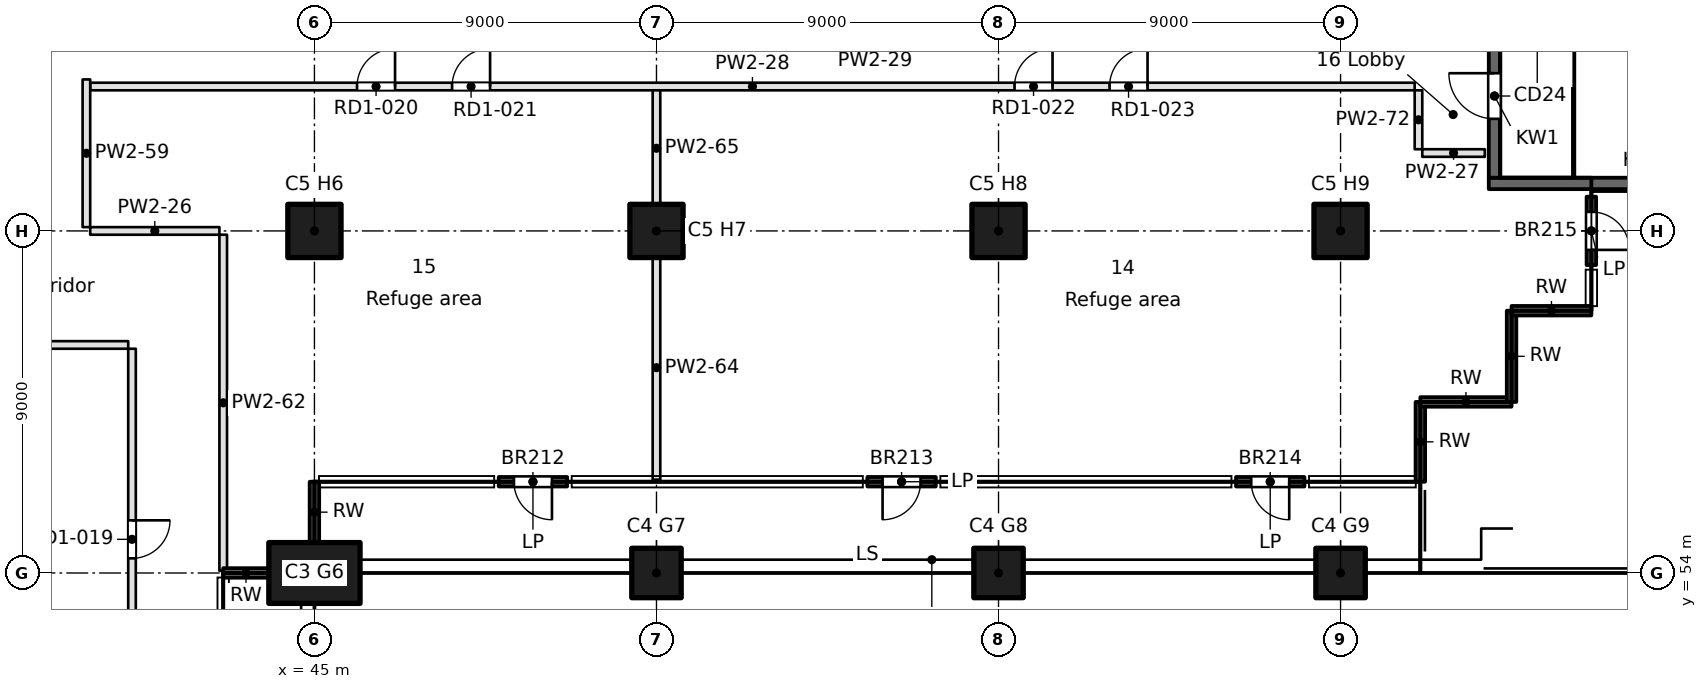
"""IFC4 building model, lengths in metres.
Left out: names, types, materials, properties, quantities, classifications, styles, units other than length and angle.
Written with IfcOpenShell. Run it as: python <this file> out.ifc"""

import sys

from ifc_helpers import new_model, si_unit, direction, frame, frame_2d, origin, origin_2d, place, context, subcontext, project, spatial, rectangle, extrude, element, fill, save


model = new_model("IFC4")
c1 = context("Model", 3, precision=1e-05, world=origin(), true_north=direction((0.0, 1.0)))
c2 = subcontext(c1, "Body", "Model", "MODEL_VIEW")
j1 = project(units=[si_unit("LENGTHUNIT", "METRE"), si_unit("PLANEANGLEUNIT", "RADIAN")], contexts=[c1])
p1 = place(None, origin())
s1 = spatial("IfcSite", under=j1, at=p1, CompositionType="ELEMENT")
p2 = place(p1, origin())
s2 = spatial("IfcBuilding", under=s1, at=p2, CompositionType="ELEMENT")
p3 = place(p2, frame((0.0, 0.0, 80.2)))
s3 = spatial("IfcBuildingStorey", under=s2, at=p3, CompositionType="ELEMENT", Elevation=80.2)
p4 = place(p3, frame((45.0, 54.0, 0.0), z_axis=(0.0, 0.0, 1.0), x_axis=(1.0, 0.0, 0.0)))
e1 = element("IfcColumn", 1, at=p4, inside=s3, PredefinedType="COLUMN", context=c2, shape_type="SweptSolid", body=[
    extrude(rectangle(XDim=2.4, YDim=1.6, at=origin_2d()), origin(), (0.0, 0.0, 1.0), 4.6),
])
for number, where, z_axis, x_axis in (
    (2, (54.0, 54.0, 0.0), (0.0, 0.0, 1.0), (1.0, 0.0, 0.0)),
    (3, (63.0, 54.0, 0.0), (0.0, 0.0, 1.0), (1.0, 0.0, 0.0)),
    (4, (72.0, 54.0, 0.0), (0.0, 0.0, 1.0), (1.0, 0.0, 0.0)),
):
    element("IfcColumn", number, at=place(p3, frame(where, z_axis=z_axis, x_axis=x_axis)), inside=s3, PredefinedType="COLUMN", context=c2, shape_type="SweptSolid", body=[
        extrude(rectangle(XDim=1.3, YDim=1.3, at=origin_2d()), origin(), (0.0, 0.0, 1.0), 4.6),
    ])
for number, where, z_axis, x_axis in (
    (5, (45.0, 63.0, 0.0), (0.0, 0.0, 1.0), (1.0, 0.0, 0.0)),
    (6, (54.0, 63.0, 0.0), (0.0, 0.0, 1.0), (1.0, 0.0, 0.0)),
    (7, (63.0, 63.0, 0.0), (0.0, 0.0, 1.0), (1.0, 0.0, 0.0)),
    (8, (72.0, 63.0, 0.0), (0.0, 0.0, 1.0), (1.0, 0.0, 0.0)),
):
    element("IfcColumn", number, at=place(p3, frame(where, z_axis=z_axis, x_axis=x_axis)), inside=s3, PredefinedType="COLUMN", context=c2, shape_type="SweptSolid", body=[
        extrude(rectangle(XDim=1.4, YDim=1.4, at=origin_2d()), origin(), (0.0, 0.0, 1.0), 4.6),
    ])
p5 = place(p3, frame((42.599, 54.001, 0.0), z_axis=(0.0, 0.0, 1.0), x_axis=(1.0, 0.0, 0.0)))
e9 = element("IfcWall", 9, at=p5, inside=s3, PredefinedType="SOLIDWALL", context=c2, shape_type="SweptSolid", body=[
    extrude(rectangle(XDim=1.201, YDim=0.25, at=frame_2d((0.6, 0.0))), origin(), (0.0, 0.0, 1.0), 4.2),
])
p6 = place(p3, frame((44.999, 54.8, 0.0), z_axis=(0.0, 0.0, 1.0), x_axis=(0.00045752626, 0.999999895335, 0.0)))
e10 = element("IfcWall", 10, at=p6, inside=s3, PredefinedType="SOLIDWALL", context=c2, shape_type="SweptSolid", body=[
    extrude(rectangle(XDim=1.601, YDim=0.25, at=frame_2d((0.8, 0.0))), origin(), (0.0, 0.0, 1.0), 4.2),
])
p7 = place(p3, frame((49.85, 56.401, 0.0), z_axis=(0.0, 0.0, 1.0), x_axis=(1.0, 0.0, 0.0)))
e11 = element("IfcWall", 11, at=p7, inside=s3, PredefinedType="SOLIDWALL", context=c2, shape_type="SweptSolid", body=[
    extrude(rectangle(XDim=1.8, YDim=0.25, at=frame_2d((0.9, 0.0))), origin(), (0.0, 0.0, 1.0), 4.2),
])
p8 = place(p7, frame((0.4, 0.0, 0.0)))
e12 = element("IfcOpeningElement", 12, at=p8, cuts=e11, PredefinedType="OPENING", context=c2, shape_type="SweptSolid", body=[
    extrude(rectangle(XDim=1.0, YDim=2.1, at=frame_2d((0.5, 1.05))), frame((0.0, 0.125, 0.0), z_axis=(0.0, -1.0, 0.0), x_axis=(1.0, 0.0, 0.0)), (0.0, 0.0, 1.0), 0.25),
])
p9 = place(p3, frame((59.55, 56.401, 0.0), z_axis=(0.0, 0.0, 1.0), x_axis=(1.0, 0.0, 0.0)))
e13 = element("IfcWall", 13, at=p9, inside=s3, PredefinedType="SOLIDWALL", context=c2, shape_type="SweptSolid", body=[
    extrude(rectangle(XDim=1.8, YDim=0.25, at=frame_2d((0.9, 0.0))), origin(), (0.0, 0.0, 1.0), 4.2),
])
p10 = place(p9, frame((0.4, 0.0, 0.0)))
e14 = element("IfcOpeningElement", 14, at=p10, cuts=e13, PredefinedType="OPENING", context=c2, shape_type="SweptSolid", body=[
    extrude(rectangle(XDim=1.0, YDim=2.1, at=frame_2d((0.5, 1.05))), frame((0.0, 0.125, 0.0), z_axis=(0.0, -1.0, 0.0), x_axis=(1.0, 0.0, 0.0)), (0.0, 0.0, 1.0), 0.25),
])
p11 = place(p3, frame((69.249, 56.401, 0.0), z_axis=(0.0, 0.0, 1.0), x_axis=(1.0, 0.0, 0.0)))
e15 = element("IfcWall", 15, at=p11, inside=s3, PredefinedType="SOLIDWALL", context=c2, shape_type="SweptSolid", body=[
    extrude(rectangle(XDim=1.8, YDim=0.25, at=frame_2d((0.9, 0.0))), origin(), (0.0, 0.0, 1.0), 4.2),
])
p12 = place(p11, frame((0.4, 0.0, 0.0)))
e16 = element("IfcOpeningElement", 16, at=p12, cuts=e15, PredefinedType="OPENING", context=c2, shape_type="SweptSolid", body=[
    extrude(rectangle(XDim=1.0, YDim=2.1, at=frame_2d((0.5, 1.05))), frame((0.0, 0.125, 0.0), z_axis=(0.0, -1.0, 0.0), x_axis=(1.0, 0.0, 0.0)), (0.0, 0.0, 1.0), 0.25),
])
p13 = place(p3, frame((74.099, 56.401, 0.0), z_axis=(0.0, 0.0, 1.0), x_axis=(0.00011626555, 0.999999993241, 0.0)))
e17 = element("IfcWall", 17, at=p13, inside=s3, PredefinedType="SOLIDWALL", context=c2, shape_type="SweptSolid", body=[
    extrude(rectangle(XDim=2.1, YDim=0.25, at=frame_2d((1.05, 0.0))), origin(), (0.0, 0.0, 1.0), 4.2),
])
for number, where, z_axis, x_axis in (
    (18, (74.099, 58.501, 0.0), (0.0, 0.0, 1.0), (1.0, 0.0, 0.0)),
    (19, (76.499, 58.501, 0.0), (0.0, 0.0, 1.0), (0.0, 1.0, 0.0)),
):
    element("IfcWall", number, at=place(p3, frame(where, z_axis=z_axis, x_axis=x_axis)), inside=s3, PredefinedType="SOLIDWALL", context=c2, shape_type="SweptSolid", body=[
        extrude(rectangle(XDim=2.4, YDim=0.25, at=frame_2d((1.2, 0.0))), origin(), (0.0, 0.0, 1.0), 4.2),
    ])
p14 = place(p3, frame((76.499, 60.901, 0.0), z_axis=(0.0, 0.0, 1.0), x_axis=(0.999999993241, 0.00011626555, 0.0)))
e20 = element("IfcWall", 20, at=p14, inside=s3, PredefinedType="SOLIDWALL", context=c2, shape_type="SweptSolid", body=[
    extrude(rectangle(XDim=2.1, YDim=0.25, at=frame_2d((1.05, 0.0))), origin(), (0.0, 0.0, 1.0), 4.2),
])
p15 = place(p3, frame((78.599, 62.101, 0.0), z_axis=(0.0, 0.0, 1.0), x_axis=(0.0, 1.0, 0.0)))
e21 = element("IfcWall", 21, at=p15, inside=s3, PredefinedType="SOLIDWALL", context=c2, shape_type="SweptSolid", body=[
    extrude(rectangle(XDim=1.8, YDim=0.25, at=frame_2d((0.9, 0.0))), origin(), (0.0, 0.0, 1.0), 4.2),
])
p16 = place(p15, frame((0.4, 0.0, 0.0)))
e22 = element("IfcOpeningElement", 22, at=p16, cuts=e21, PredefinedType="OPENING", context=c2, shape_type="SweptSolid", body=[
    extrude(rectangle(XDim=1.0, YDim=2.1, at=frame_2d((0.5, 1.05))), frame((0.0, 0.125, 0.0), z_axis=(0.0, -1.0, 0.0), x_axis=(1.0, 0.0, 0.0)), (0.0, 0.0, 1.0), 0.25),
])
p17 = place(p3, frame((75.9, 64.25, -0.45), z_axis=(0.0, 0.0, 1.0), x_axis=(1.0, 0.0, 0.0)))
e23 = element("IfcWall", 23, at=p17, inside=s3, PredefinedType="SOLIDWALL", context=c2, shape_type="SweptSolid", body=[
    extrude(rectangle(XDim=8.2, YDim=0.3, at=frame_2d((4.1, 0.0))), origin(), (0.0, 0.0, 1.0), 4.65),
])
p18 = place(p3, frame((76.05, 64.4, -0.45), z_axis=(0.0, 0.0, 1.0), x_axis=(0.0, 1.0, 0.0)))
e24 = element("IfcWall", 24, at=p18, inside=s3, PredefinedType="SOLIDWALL", context=c2, shape_type="SweptSolid", body=[
    extrude(rectangle(XDim=4.3, YDim=0.3, at=frame_2d((2.15, 0.0))), origin(), (0.0, 0.0, 1.0), 4.65),
])
p19 = place(p18, frame((1.55, 0.0, 0.45)))
e25 = element("IfcOpeningElement", 25, at=p19, cuts=e24, PredefinedType="OPENING", context=c2, shape_type="SweptSolid", body=[
    extrude(rectangle(XDim=1.2, YDim=2.1, at=frame_2d((0.6, 1.05))), frame((0.0, 0.15, 0.0), z_axis=(0.0, -1.0, 0.0), x_axis=(1.0, 0.0, 0.0)), (0.0, 0.0, 1.0), 0.3),
])
p20 = place(p3, frame((40.1, 60.0, 0.0), z_axis=(0.0, 0.0, 1.0), x_axis=(-1.0, 0.0, 0.0)))
e26 = element("IfcWall", 26, at=p20, inside=s3, PredefinedType="PARTITIONING", context=c2, shape_type="SweptSolid", body=[
    extrude(rectangle(XDim=13.853, YDim=0.2, at=frame_2d((6.926, 0.0))), origin(), (0.0, 0.0, 1.0), 4.2),
])
p21 = place(p3, frame((39.1, 63.0, 0.0), z_axis=(0.0, 0.0, 1.0), x_axis=(1.0, 0.0, 0.0)))
e27 = element("IfcWall", 27, at=p21, inside=s3, PredefinedType="PARTITIONING", context=c2, shape_type="SweptSolid", body=[
    extrude(rectangle(XDim=3.4, YDim=0.2, at=frame_2d((1.7, 0.0))), origin(), (0.0, 0.0, 1.0), 4.2),
])
p22 = place(p3, frame((75.796, 65.05, 0.0), z_axis=(0.0, 0.0, 1.0), x_axis=(-1.0, 0.0, 0.0)))
e28 = element("IfcWall", 28, at=p22, inside=s3, PredefinedType="PARTITIONING", context=c2, shape_type="SweptSolid", body=[
    extrude(rectangle(XDim=1.646, YDim=0.2, at=frame_2d((0.823, 0.0))), origin(), (0.0, 0.0, 1.0), 4.2),
])
p23 = place(p3, frame((73.95, 66.8, 0.0), z_axis=(0.0, 0.0, 1.0), x_axis=(-1.0, 0.0, 0.0)))
e29 = element("IfcWall", 29, at=p23, inside=s3, PredefinedType="PARTITIONING", context=c2, shape_type="SweptSolid", body=[
    extrude(rectangle(XDim=34.85, YDim=0.2, at=frame_2d((17.425, 0.0))), origin(), (0.0, 0.0, 1.0), 4.2),
])
p24 = place(p23, frame((26.828, 0.0, 0.0)))
e30 = element("IfcOpeningElement", 30, at=p24, cuts=e29, PredefinedType="OPENING", context=c2, shape_type="SweptSolid", body=[
    extrude(rectangle(XDim=1.0, YDim=2.1, at=frame_2d((0.5, 1.05))), frame((0.0, 0.1, 0.0), z_axis=(0.0, -1.0, 0.0), x_axis=(1.0, 0.0, 0.0)), (0.0, 0.0, 1.0), 0.2),
])
p25 = place(p23, frame((24.328, 0.0, 0.0)))
e31 = element("IfcOpeningElement", 31, at=p25, cuts=e29, PredefinedType="OPENING", context=c2, shape_type="SweptSolid", body=[
    extrude(rectangle(XDim=1.0, YDim=2.1, at=frame_2d((0.5, 1.05))), frame((0.0, 0.1, 0.0), z_axis=(0.0, -1.0, 0.0), x_axis=(1.0, 0.0, 0.0)), (0.0, 0.0, 1.0), 0.2),
])
p26 = place(p23, frame((9.529, 0.0, 0.0)))
e32 = element("IfcOpeningElement", 32, at=p26, cuts=e29, PredefinedType="OPENING", context=c2, shape_type="SweptSolid", body=[
    extrude(rectangle(XDim=1.0, YDim=2.1, at=frame_2d((0.5, 1.05))), frame((0.0, 0.1, 0.0), z_axis=(0.0, -1.0, 0.0), x_axis=(1.0, 0.0, 0.0)), (0.0, 0.0, 1.0), 0.2),
])
p27 = place(p23, frame((7.029, 0.0, 0.0)))
e33 = element("IfcOpeningElement", 33, at=p27, cuts=e29, PredefinedType="OPENING", context=c2, shape_type="SweptSolid", body=[
    extrude(rectangle(XDim=1.0, YDim=2.1, at=frame_2d((0.5, 1.05))), frame((0.0, 0.1, 0.0), z_axis=(0.0, -1.0, 0.0), x_axis=(1.0, 0.0, 0.0)), (0.0, 0.0, 1.0), 0.2),
])
p28 = place(p3, frame((39.0, 66.986, 0.0), z_axis=(0.0, 0.0, 1.0), x_axis=(0.0, -1.0, 0.0)))
e34 = element("IfcWall", 34, at=p28, inside=s3, PredefinedType="PARTITIONING", context=c2, shape_type="SweptSolid", body=[
    extrude(rectangle(XDim=3.886, YDim=0.2, at=frame_2d((1.943, 0.0))), origin(), (0.0, 0.0, 1.0), 4.2),
])
p29 = place(p3, frame((40.2, 19.322, 0.0), z_axis=(0.0, 0.0, 1.0), x_axis=(0.0, 1.0, 0.0)))
e35 = element("IfcWall", 35, at=p29, inside=s3, PredefinedType="PARTITIONING", context=c2, shape_type="SweptSolid", body=[
    extrude(rectangle(XDim=40.578, YDim=0.2, at=frame_2d((20.289, 0.0))), origin(), (0.0, 0.0, 1.0), 4.2),
])
p30 = place(p29, frame((3.383, 0.0, 0.0)))
e36 = element("IfcOpeningElement", 36, at=p30, cuts=e35, PredefinedType="OPENING", context=c2, shape_type="SweptSolid", body=[
    extrude(rectangle(XDim=1.0, YDim=2.1, at=frame_2d((0.5, 1.05))), frame((0.0, 0.1, 0.0), z_axis=(0.0, -1.0, 0.0), x_axis=(1.0, 0.0, 0.0)), (0.0, 0.0, 1.0), 0.2),
])
p31 = place(p29, frame((5.883, 0.0, 0.0)))
e37 = element("IfcOpeningElement", 37, at=p31, cuts=e35, PredefinedType="OPENING", context=c2, shape_type="SweptSolid", body=[
    extrude(rectangle(XDim=1.0, YDim=2.1, at=frame_2d((0.5, 1.05))), frame((0.0, 0.1, 0.0), z_axis=(0.0, -1.0, 0.0), x_axis=(1.0, 0.0, 0.0)), (0.0, 0.0, 1.0), 0.2),
])
p32 = place(p29, frame((11.774, 0.0, 0.0)))
e38 = element("IfcOpeningElement", 38, at=p32, cuts=e35, PredefinedType="OPENING", context=c2, shape_type="SweptSolid", body=[
    extrude(rectangle(XDim=1.0, YDim=2.1, at=frame_2d((0.5, 1.05))), frame((0.0, 0.1, 0.0), z_axis=(0.0, -1.0, 0.0), x_axis=(1.0, 0.0, 0.0)), (0.0, 0.0, 1.0), 0.2),
])
p33 = place(p29, frame((14.274, 0.0, 0.0)))
e39 = element("IfcOpeningElement", 39, at=p33, cuts=e35, PredefinedType="OPENING", context=c2, shape_type="SweptSolid", body=[
    extrude(rectangle(XDim=1.0, YDim=2.1, at=frame_2d((0.5, 1.05))), frame((0.0, 0.1, 0.0), z_axis=(0.0, -1.0, 0.0), x_axis=(1.0, 0.0, 0.0)), (0.0, 0.0, 1.0), 0.2),
])
p34 = place(p29, frame((20.791, 0.0, 0.0)))
e40 = element("IfcOpeningElement", 40, at=p34, cuts=e35, PredefinedType="OPENING", context=c2, shape_type="SweptSolid", body=[
    extrude(rectangle(XDim=1.0, YDim=2.1, at=frame_2d((0.5, 1.05))), frame((0.0, 0.1, 0.0), z_axis=(0.0, -1.0, 0.0), x_axis=(1.0, 0.0, 0.0)), (0.0, 0.0, 1.0), 0.2),
])
p35 = place(p29, frame((23.291, 0.0, 0.0)))
e41 = element("IfcOpeningElement", 41, at=p35, cuts=e35, PredefinedType="OPENING", context=c2, shape_type="SweptSolid", body=[
    extrude(rectangle(XDim=1.0, YDim=2.1, at=frame_2d((0.5, 1.05))), frame((0.0, 0.1, 0.0), z_axis=(0.0, -1.0, 0.0), x_axis=(1.0, 0.0, 0.0)), (0.0, 0.0, 1.0), 0.2),
])
p36 = place(p29, frame((32.564, 0.0, 0.0)))
e42 = element("IfcOpeningElement", 42, at=p36, cuts=e35, PredefinedType="OPENING", context=c2, shape_type="SweptSolid", body=[
    extrude(rectangle(XDim=1.0, YDim=2.1, at=frame_2d((0.5, 1.05))), frame((0.0, 0.1, 0.0), z_axis=(0.0, -1.0, 0.0), x_axis=(1.0, 0.0, 0.0)), (0.0, 0.0, 1.0), 0.2),
])
p37 = place(p29, frame((35.064, 0.0, 0.0)))
e43 = element("IfcOpeningElement", 43, at=p37, cuts=e35, PredefinedType="OPENING", context=c2, shape_type="SweptSolid", body=[
    extrude(rectangle(XDim=1.0, YDim=2.1, at=frame_2d((0.5, 1.05))), frame((0.0, 0.1, 0.0), z_axis=(0.0, -1.0, 0.0), x_axis=(1.0, 0.0, 0.0)), (0.0, 0.0, 1.0), 0.2),
])
p38 = place(p3, frame((42.6, 62.9, 0.0), z_axis=(0.0, 0.0, 1.0), x_axis=(0.0, -1.0, 0.0)))
e44 = element("IfcWall", 44, at=p38, inside=s3, PredefinedType="PARTITIONING", context=c2, shape_type="SweptSolid", body=[
    extrude(rectangle(XDim=8.845, YDim=0.2, at=frame_2d((4.423, 0.0))), origin(), (0.0, 0.0, 1.0), 4.2),
])
p39 = place(p3, frame((54.0, 62.35, 0.0), z_axis=(0.0, 0.0, 1.0), x_axis=(0.0, -1.0, 0.0)))
e45 = element("IfcWall", 45, at=p39, inside=s3, PredefinedType="PARTITIONING", context=c2, shape_type="SweptSolid", body=[
    extrude(rectangle(XDim=5.895, YDim=0.2, at=frame_2d((2.948, 0.0))), origin(), (0.0, 0.0, 1.0), 4.2),
])
p40 = place(p3, frame((54.0, 66.7, 0.0), z_axis=(0.0, 0.0, 1.0), x_axis=(0.0, -1.0, 0.0)))
e46 = element("IfcWall", 46, at=p40, inside=s3, PredefinedType="PARTITIONING", context=c2, shape_type="SweptSolid", body=[
    extrude(rectangle(XDim=3.05, YDim=0.2, at=frame_2d((1.525, 0.0))), origin(), (0.0, 0.0, 1.0), 4.2),
])
p41 = place(p3, frame((74.05, 65.15, 0.0), z_axis=(0.0, 0.0, 1.0), x_axis=(0.0, 1.0, 0.0)))
e47 = element("IfcWall", 47, at=p41, inside=s3, PredefinedType="PARTITIONING", context=c2, shape_type="SweptSolid", body=[
    extrude(rectangle(XDim=1.55, YDim=0.2, at=frame_2d((0.775, 0.0))), origin(), (0.0, 0.0, 1.0), 4.2),
])
p42 = place(p8, frame((1.0, 0.0, 0.0), z_axis=(0.0, 0.0, 1.0), x_axis=(-1.0, 0.0, 0.0)))
e48 = element("IfcDoor", 48, at=p42, inside=s3, OperationType="SINGLE_SWING_LEFT", PredefinedType="DOOR", context=c2, shape_type="SweptSolid", body=[
    extrude(rectangle(XDim=1.0, YDim=2.1, at=frame_2d((0.5, 1.05))), frame((0.0, 0.025, 0.0), z_axis=(0.0, -1.0, 0.0), x_axis=(1.0, 0.0, 0.0)), (0.0, 0.0, 1.0), 0.05),
])
fill(e12, e48)
p43 = place(p10, frame((1.0, 0.0, 0.0), z_axis=(0.0, 0.0, 1.0), x_axis=(-1.0, 0.0, 0.0)))
e49 = element("IfcDoor", 49, at=p43, inside=s3, OperationType="SINGLE_SWING_RIGHT", PredefinedType="DOOR", context=c2, shape_type="SweptSolid", body=[
    extrude(rectangle(XDim=1.0, YDim=2.1, at=frame_2d((0.5, 1.05))), frame((0.0, 0.025, 0.0), z_axis=(0.0, -1.0, 0.0), x_axis=(1.0, 0.0, 0.0)), (0.0, 0.0, 1.0), 0.05),
])
fill(e14, e49)
p44 = place(p12, frame((1.0, 0.0, 0.0), z_axis=(0.0, 0.0, 1.0), x_axis=(-1.0, 0.0, 0.0)))
e50 = element("IfcDoor", 50, at=p44, inside=s3, OperationType="SINGLE_SWING_LEFT", PredefinedType="DOOR", context=c2, shape_type="SweptSolid", body=[
    extrude(rectangle(XDim=1.0, YDim=2.1, at=frame_2d((0.5, 1.05))), frame((0.0, 0.025, 0.0), z_axis=(0.0, -1.0, 0.0), x_axis=(1.0, 0.0, 0.0)), (0.0, 0.0, 1.0), 0.05),
])
fill(e16, e50)
p45 = place(p16, frame((1.0, 0.0, 0.0), z_axis=(0.0, 0.0, 1.0), x_axis=(-1.0, 0.0, 0.0)))
e51 = element("IfcDoor", 51, at=p45, inside=s3, OperationType="SINGLE_SWING_RIGHT", PredefinedType="DOOR", context=c2, shape_type="SweptSolid", body=[
    extrude(rectangle(XDim=1.0, YDim=2.1, at=frame_2d((0.5, 1.05))), frame((0.0, 0.025, 0.0), z_axis=(0.0, -1.0, 0.0), x_axis=(1.0, 0.0, 0.0)), (0.0, 0.0, 1.0), 0.05),
])
fill(e22, e51)
p46 = place(p19, origin())
e52 = element("IfcDoor", 52, at=p46, inside=s3, OperationType="SINGLE_SWING_RIGHT", PredefinedType="DOOR", context=c2, shape_type="SweptSolid", body=[
    extrude(rectangle(XDim=1.2, YDim=2.1, at=frame_2d((0.6, 1.05))), frame((0.0, 0.025, 0.0), z_axis=(0.0, -1.0, 0.0), x_axis=(1.0, 0.0, 0.0)), (0.0, 0.0, 1.0), 0.05),
])
fill(e25, e52)
p47 = place(p37, frame((1.0, 0.0, 0.0), z_axis=(0.0, 0.0, 1.0), x_axis=(-1.0, 0.0, 0.0)))
e53 = element("IfcDoor", 53, at=p47, inside=s3, OperationType="SINGLE_SWING_LEFT", PredefinedType="DOOR", context=c2, shape_type="SweptSolid", body=[
    extrude(rectangle(XDim=1.0, YDim=2.1, at=frame_2d((0.5, 1.05))), frame((0.0, 0.025, 0.0), z_axis=(0.0, -1.0, 0.0), x_axis=(1.0, 0.0, 0.0)), (0.0, 0.0, 1.0), 0.05),
])
fill(e43, e53)
p48 = place(p24, frame((1.0, 0.0, 0.0), z_axis=(0.0, 0.0, 1.0), x_axis=(-1.0, 0.0, 0.0)))
e54 = element("IfcDoor", 54, at=p48, inside=s3, OperationType="SINGLE_SWING_RIGHT", PredefinedType="DOOR", context=c2, shape_type="SweptSolid", body=[
    extrude(rectangle(XDim=1.0, YDim=2.1, at=frame_2d((0.5, 1.05))), frame((0.0, 0.025, 0.0), z_axis=(0.0, -1.0, 0.0), x_axis=(1.0, 0.0, 0.0)), (0.0, 0.0, 1.0), 0.05),
])
fill(e30, e54)
p49 = place(p25, frame((1.0, 0.0, 0.0), z_axis=(0.0, 0.0, 1.0), x_axis=(-1.0, 0.0, 0.0)))
e55 = element("IfcDoor", 55, at=p49, inside=s3, OperationType="SINGLE_SWING_RIGHT", PredefinedType="DOOR", context=c2, shape_type="SweptSolid", body=[
    extrude(rectangle(XDim=1.0, YDim=2.1, at=frame_2d((0.5, 1.05))), frame((0.0, 0.025, 0.0), z_axis=(0.0, -1.0, 0.0), x_axis=(1.0, 0.0, 0.0)), (0.0, 0.0, 1.0), 0.05),
])
fill(e31, e55)
p50 = place(p26, frame((1.0, 0.0, 0.0), z_axis=(0.0, 0.0, 1.0), x_axis=(-1.0, 0.0, 0.0)))
e56 = element("IfcDoor", 56, at=p50, inside=s3, OperationType="SINGLE_SWING_RIGHT", PredefinedType="DOOR", context=c2, shape_type="SweptSolid", body=[
    extrude(rectangle(XDim=1.0, YDim=2.1, at=frame_2d((0.5, 1.05))), frame((0.0, 0.025, 0.0), z_axis=(0.0, -1.0, 0.0), x_axis=(1.0, 0.0, 0.0)), (0.0, 0.0, 1.0), 0.05),
])
fill(e32, e56)
p51 = place(p27, frame((1.0, 0.0, 0.0), z_axis=(0.0, 0.0, 1.0), x_axis=(-1.0, 0.0, 0.0)))
e57 = element("IfcDoor", 57, at=p51, inside=s3, OperationType="SINGLE_SWING_RIGHT", PredefinedType="DOOR", context=c2, shape_type="SweptSolid", body=[
    extrude(rectangle(XDim=1.0, YDim=2.1, at=frame_2d((0.5, 1.05))), frame((0.0, 0.025, 0.0), z_axis=(0.0, -1.0, 0.0), x_axis=(1.0, 0.0, 0.0)), (0.0, 0.0, 1.0), 0.05),
])
fill(e33, e57)
save(model, sys.argv[1])
